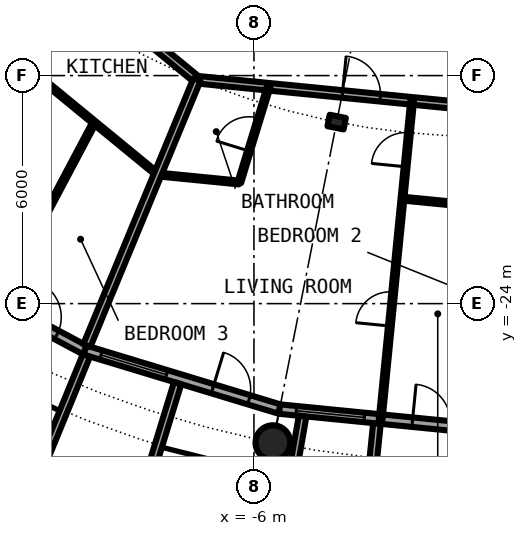
"""IFC4 building model, lengths in metres.
Left out: names, types, materials, properties, quantities, classifications, styles, units other than length and angle.
Written with IfcOpenShell. Run it as: python <this file> out.ifc"""

import sys

from ifc_helpers import new_model, si_unit, direction, frame, frame_2d, origin, origin_2d, place, context, subcontext, project, spatial, rectangle, circle, hollow_circle, i_section, extrude, element, fill, save


model = new_model("IFC4")
c1 = context("Model", 3, precision=1e-05, world=origin(), true_north=direction((0.0, 1.0)))
c2 = subcontext(c1, "Body", "Model", "MODEL_VIEW")
j1 = project(units=[si_unit("LENGTHUNIT", "METRE"), si_unit("PLANEANGLEUNIT", "RADIAN")], contexts=[c1])
p1 = place(None, origin())
s1 = spatial("IfcSite", under=j1, at=p1, CompositionType="ELEMENT")
p2 = place(p1, origin())
s2 = spatial("IfcBuilding", under=s1, at=p2, CompositionType="ELEMENT")
p3 = place(p2, frame((0.0, 0.0, 111.65)))
s3 = spatial("IfcBuildingStorey", under=s2, at=p3, CompositionType="ELEMENT", Elevation=111.65)
p4 = place(p3, frame((-5.501, -27.658, 0.0), z_axis=(0.0, 0.0, 1.0), x_axis=(1.0, 0.0, 0.0)))
e1 = element("IfcColumn", 1, at=p4, inside=s3, PredefinedType="COLUMN", context=c2, shape_type="SweptSolid", body=[
    extrude(hollow_circle(Radius=0.457, WallThickness=0.04, at=origin_2d()), origin(), (0.0, 0.0, 1.0), 3.05),
])
p5 = place(p3, frame((-3.824, -19.223, 0.0), z_axis=(0.0, 0.0, 1.0), x_axis=(-0.195090322016, -0.980785280403, 0.0)))
e2 = element("IfcColumn", 2, at=p5, inside=s3, PredefinedType="COLUMN", context=c2, shape_type="SweptSolid", body=[
    extrude(i_section(OverallWidth=0.307, OverallDepth=0.432, WebThickness=0.021, FlangeThickness=0.04, FilletRadius=0.027, at=origin_2d()), origin(), (0.0, 0.0, 1.0), 3.05),
])
p6 = place(p3, frame((-15.167, -22.699, 0.0), z_axis=(0.0, 0.0, 1.0), x_axis=(0.881915646801, -0.471407246368, 0.0)))
e3 = element("IfcWall", 3, at=p6, inside=s3, PredefinedType="SOLIDWALL", context=c2, shape_type="SweptSolid", body=[
    extrude(rectangle(XDim=5.352, YDim=0.25, at=frame_2d((2.676, 0.0))), origin(), (0.0, 0.0, 1.0), 2.7),
])
p7 = place(p6, frame((0.441, 0.0, 0.3)))
e4 = element("IfcOpeningElement", 4, at=p7, cuts=e3, PredefinedType="OPENING", context=c2, shape_type="SweptSolid", body=[
    extrude(rectangle(XDim=1.8, YDim=2.1, at=frame_2d((0.9, 1.05))), frame((0.0, 0.135, 0.0), z_axis=(0.0, -1.0, 0.0), x_axis=(1.0, 0.0, 0.0)), (0.0, 0.0, 1.0), 0.27),
])
p8 = place(p6, frame((3.51, 0.0, 0.0)))
e5 = element("IfcOpeningElement", 5, at=p8, cuts=e3, PredefinedType="OPENING", context=c2, shape_type="SweptSolid", body=[
    extrude(rectangle(XDim=1.0, YDim=2.2, at=frame_2d((0.5, 1.1))), frame((0.0, 0.135, 0.0), z_axis=(0.0, -1.0, 0.0), x_axis=(1.0, 0.0, 0.0)), (0.0, 0.0, 1.0), 0.27),
])
p9 = place(p3, frame((-10.447, -25.222, 0.0), z_axis=(0.0, 0.0, 1.0), x_axis=(0.956965678721, -0.290201119486, 0.0)))
e6 = element("IfcWall", 6, at=p9, inside=s3, PredefinedType="SOLIDWALL", context=c2, shape_type="SweptSolid", body=[
    extrude(rectangle(XDim=5.351, YDim=0.25, at=frame_2d((2.676, 0.0))), origin(), (0.0, 0.0, 1.0), 2.7),
])
p10 = place(p9, frame((0.441, 0.0, 0.3)))
e7 = element("IfcOpeningElement", 7, at=p10, cuts=e6, PredefinedType="OPENING", context=c2, shape_type="SweptSolid", body=[
    extrude(rectangle(XDim=1.8, YDim=2.1, at=frame_2d((0.9, 1.05))), frame((0.0, 0.135, 0.0), z_axis=(0.0, -1.0, 0.0), x_axis=(1.0, 0.0, 0.0)), (0.0, 0.0, 1.0), 0.27),
])
p11 = place(p9, frame((3.51, 0.0, 0.0)))
e8 = element("IfcOpeningElement", 8, at=p11, cuts=e6, PredefinedType="OPENING", context=c2, shape_type="SweptSolid", body=[
    extrude(rectangle(XDim=1.0, YDim=2.2, at=frame_2d((0.5, 1.1))), frame((0.0, 0.135, 0.0), z_axis=(0.0, -1.0, 0.0), x_axis=(1.0, 0.0, 0.0)), (0.0, 0.0, 1.0), 0.27),
])
p12 = place(p3, frame((-11.638, -28.084, -0.03), z_axis=(0.0, 0.0, 1.0), x_axis=(0.941461077774, -0.337121697664, 0.0)))
e9 = element("IfcWall", 9, at=p12, inside=s3, PredefinedType="SOLIDWALL", context=c2, shape_type="SweptSolid", body=[
    extrude(rectangle(XDim=2.993, YDim=0.2, at=frame_2d((1.497, 0.0))), origin(), (0.0, 0.0, 1.0), 2.73),
])
p13 = place(p12, frame((0.457, 0.0, 0.33)))
e10 = element("IfcOpeningElement", 10, at=p13, cuts=e9, PredefinedType="OPENING", context=c2, shape_type="SweptSolid", body=[
    extrude(circle(Radius=1.04, at=frame_2d((1.04, 1.04))), frame((0.0, 0.11, 0.0), z_axis=(0.0, -1.0, 0.0), x_axis=(1.0, 0.0, 0.0)), (0.0, 0.0, 1.0), 0.22),
])
p14 = place(p3, frame((-10.409, -25.364, -0.03), z_axis=(0.0, 0.0, 1.0), x_axis=(-0.379509886562, -0.925187681501, 0.0)))
e11 = element("IfcWall", 11, at=p14, inside=s3, PredefinedType="SOLIDWALL", context=c2, shape_type="SweptSolid", body=[
    extrude(rectangle(XDim=2.883, YDim=0.2, at=frame_2d((1.441, 0.0))), origin(), (0.0, 0.0, 1.0), 2.73),
])
p15 = place(p3, frame((-8.009, -26.092, -0.03), z_axis=(0.0, 0.0, 1.0), x_axis=(-0.293406695073, -0.955987715029, 0.0)))
e12 = element("IfcWall", 12, at=p15, inside=s3, PredefinedType="SOLIDWALL", context=c2, shape_type="SweptSolid", body=[
    extrude(rectangle(XDim=3.006, YDim=0.2, at=frame_2d((1.503, 0.0))), origin(), (0.0, 0.0, 1.0), 2.73),
])
p16 = place(p3, frame((-5.326, -26.775, 0.0), z_axis=(0.0, 0.0, 1.0), x_axis=(0.995173996315, -0.098126026407, 0.0)))
e13 = element("IfcWall", 13, at=p16, inside=s3, PredefinedType="SOLIDWALL", context=c2, shape_type="SweptSolid", body=[
    extrude(rectangle(XDim=5.352, YDim=0.25, at=frame_2d((2.676, 0.0))), origin(), (0.0, 0.0, 1.0), 2.7),
])
p17 = place(p16, frame((0.441, 0.0, 0.3)))
e14 = element("IfcOpeningElement", 14, at=p17, cuts=e13, PredefinedType="OPENING", context=c2, shape_type="SweptSolid", body=[
    extrude(rectangle(XDim=1.8, YDim=2.1, at=frame_2d((0.9, 1.05))), frame((0.0, 0.135, 0.0), z_axis=(0.0, -1.0, 0.0), x_axis=(1.0, 0.0, 0.0)), (0.0, 0.0, 1.0), 0.27),
])
p18 = place(p16, frame((3.51, 0.0, 0.0)))
e15 = element("IfcOpeningElement", 15, at=p18, cuts=e13, PredefinedType="OPENING", context=c2, shape_type="SweptSolid", body=[
    extrude(rectangle(XDim=1.0, YDim=2.2, at=frame_2d((0.5, 1.1))), frame((0.0, 0.135, 0.0), z_axis=(0.0, -1.0, 0.0), x_axis=(1.0, 0.0, 0.0)), (0.0, 0.0, 1.0), 0.27),
])
p19 = place(p3, frame((-4.72, -26.961, -0.03), z_axis=(0.0, 0.0, 1.0), x_axis=(-0.172463232037, -0.98501595601, 0.0)))
e16 = element("IfcWall", 16, at=p19, inside=s3, PredefinedType="SOLIDWALL", context=c2, shape_type="SweptSolid", body=[
    extrude(rectangle(XDim=2.929, YDim=0.2, at=frame_2d((1.464, 0.0))), origin(), (0.0, 0.0, 1.0), 2.73),
])
p20 = place(p3, frame((-2.764, -27.153, -0.03), z_axis=(0.0, 0.0, 1.0), x_axis=(-0.101505487237, -0.994834979311, 0.0)))
e17 = element("IfcWall", 17, at=p20, inside=s3, PredefinedType="SOLIDWALL", context=c2, shape_type="SweptSolid", body=[
    extrude(rectangle(XDim=3.007, YDim=0.2, at=frame_2d((1.503, 0.0))), origin(), (0.0, 0.0, 1.0), 2.73),
])
p21 = place(p3, frame((-13.538, -16.496, 0.0), z_axis=(0.0, 0.0, 1.0), x_axis=(0.773000340237, -0.634405606843, 0.0)))
e18 = element("IfcWall", 18, at=p21, inside=s3, PredefinedType="PARTITIONING", context=c2, shape_type="SweptSolid", body=[
    extrude(rectangle(XDim=6.474, YDim=0.1, at=frame_2d((3.237, 0.0))), origin(), (0.0, 0.0, 1.0), 2.7),
])
p22 = place(p3, frame((-8.541, -20.601, 0.0), z_axis=(0.0, 0.0, 1.0), x_axis=(0.995168464509, -0.098182112661, 0.0)))
e19 = element("IfcWall", 19, at=p22, inside=s3, PredefinedType="PARTITIONING", context=c2, shape_type="SweptSolid", body=[
    extrude(rectangle(XDim=2.158, YDim=0.1, at=frame_2d((1.079, 0.0))), origin(), (0.0, 0.0, 1.0), 2.7),
])
p23 = place(p3, frame((-2.092, -21.237, 0.0), z_axis=(0.0, 0.0, 1.0), x_axis=(0.995182772405, -0.098036980306, 0.0)))
e20 = element("IfcWall", 20, at=p23, inside=s3, PredefinedType="PARTITIONING", context=c2, shape_type="SweptSolid", body=[
    extrude(rectangle(XDim=6.477, YDim=0.1, at=frame_2d((3.239, 0.0))), origin(), (0.0, 0.0, 1.0), 2.7),
])
p24 = place(p3, frame((-16.173, -10.991, 0.0), z_axis=(0.0, 0.0, 1.0), x_axis=(0.773013989296, -0.634388975591, 0.0)))
e21 = element("IfcWall", 21, at=p24, inside=s3, PredefinedType="PARTITIONING", context=c2, shape_type="SweptSolid", body=[
    extrude(rectangle(XDim=11.219, YDim=0.2, at=frame_2d((5.609, 0.0))), origin(), (0.0, 0.0, 1.0), 2.39),
])
p25 = place(p24, frame((3.135, 0.0, 0.0)))
e22 = element("IfcOpeningElement", 22, at=p25, cuts=e21, PredefinedType="OPENING", context=c2, shape_type="SweptSolid", body=[
    extrude(rectangle(XDim=1.0, YDim=2.3, at=frame_2d((0.5, 1.15))), frame((0.0, 0.11, 0.0), z_axis=(0.0, -1.0, 0.0), x_axis=(1.0, 0.0, 0.0)), (0.0, 0.0, 1.0), 0.22),
])
p26 = place(p3, frame((-7.501, -18.108, 0.0), z_axis=(0.0, 0.0, 1.0), x_axis=(0.995189414306, -0.097969534313, 0.0)))
e23 = element("IfcWall", 23, at=p26, inside=s3, PredefinedType="PARTITIONING", context=c2, shape_type="SweptSolid", body=[
    extrude(rectangle(XDim=11.219, YDim=0.2, at=frame_2d((5.609, 0.0))), origin(), (0.0, 0.0, 1.0), 2.39),
])
p27 = place(p26, frame((3.847, 0.0, 0.0)))
e24 = element("IfcOpeningElement", 24, at=p27, cuts=e23, PredefinedType="OPENING", context=c2, shape_type="SweptSolid", body=[
    extrude(rectangle(XDim=1.0, YDim=2.3, at=frame_2d((0.5, 1.15))), frame((0.0, 0.11, 0.0), z_axis=(0.0, -1.0, 0.0), x_axis=(1.0, 0.0, 0.0)), (0.0, 0.0, 1.0), 0.22),
])
p28 = place(p3, frame((-2.666, -27.044, 0.0), z_axis=(0.0, 0.0, 1.0), x_axis=(0.098366640075, 0.995150241984, 0.0)))
e25 = element("IfcWall", 25, at=p28, inside=s3, PredefinedType="PARTITIONING", context=c2, shape_type="SweptSolid", body=[
    extrude(rectangle(XDim=8.419, YDim=0.1, at=frame_2d((4.209, 0.0))), origin(), (0.0, 0.0, 1.0), 2.7),
])
p29 = place(p28, frame((6.677, 0.0, 0.0)))
e26 = element("IfcOpeningElement", 26, at=p29, cuts=e25, PredefinedType="OPENING", context=c2, shape_type="SweptSolid", body=[
    extrude(rectangle(XDim=0.9, YDim=2.3, at=frame_2d((0.45, 1.15))), frame((0.0, 0.06, 0.0), z_axis=(0.0, -1.0, 0.0), x_axis=(1.0, 0.0, 0.0)), (0.0, 0.0, 1.0), 0.12),
])
p30 = place(p28, frame((2.466, 0.0, 0.0)))
e27 = element("IfcOpeningElement", 27, at=p30, cuts=e25, PredefinedType="OPENING", context=c2, shape_type="SweptSolid", body=[
    extrude(rectangle(XDim=0.9, YDim=2.3, at=frame_2d((0.45, 1.15))), frame((0.0, 0.06, 0.0), z_axis=(0.0, -1.0, 0.0), x_axis=(1.0, 0.0, 0.0)), (0.0, 0.0, 1.0), 0.12),
])
p31 = place(p3, frame((-12.734, -24.007, 0.0), z_axis=(0.0, 0.0, 1.0), x_axis=(0.468610030042, 0.883405139075, 0.0)))
e28 = element("IfcWall", 28, at=p31, inside=s3, PredefinedType="PARTITIONING", context=c2, shape_type="SweptSolid", body=[
    extrude(rectangle(XDim=5.403, YDim=0.1, at=frame_2d((2.702, 0.0))), origin(), (0.0, 0.0, 1.0), 2.7),
])
p32 = place(p31, frame((2.252, 0.0, 0.0)))
e29 = element("IfcOpeningElement", 29, at=p32, cuts=e28, PredefinedType="OPENING", context=c2, shape_type="SweptSolid", body=[
    extrude(rectangle(XDim=0.9, YDim=2.3, at=frame_2d((0.45, 1.15))), frame((0.0, 0.06, 0.0), z_axis=(0.0, -1.0, 0.0), x_axis=(1.0, 0.0, 0.0)), (0.0, 0.0, 1.0), 0.12),
])
p33 = place(p3, frame((-10.399, -25.106, 0.0), z_axis=(0.0, 0.0, 1.0), x_axis=(0.382600411313, 0.923913916587, 0.0)))
e30 = element("IfcWall", 30, at=p33, inside=s3, PredefinedType="PARTITIONING", context=c2, shape_type="SweptSolid", body=[
    extrude(rectangle(XDim=7.574, YDim=0.2, at=frame_2d((3.787, 0.0))), origin(), (0.0, 0.0, 1.0), 2.7),
])
p34 = place(p3, frame((-6.386, -20.814, 0.0), z_axis=(0.0, 0.0, 1.0), x_axis=(0.293239623814, 0.956038975683, 0.0)))
e31 = element("IfcWall", 31, at=p34, inside=s3, PredefinedType="PARTITIONING", context=c2, shape_type="SweptSolid", body=[
    extrude(rectangle(XDim=2.636, YDim=0.1, at=frame_2d((1.318, 0.0))), origin(), (0.0, 0.0, 1.0), 2.7),
])
p35 = place(p34, frame((0.868, 0.0, 0.0)))
e32 = element("IfcOpeningElement", 32, at=p35, cuts=e31, PredefinedType="OPENING", context=c2, shape_type="SweptSolid", body=[
    extrude(rectangle(XDim=0.9, YDim=2.3, at=frame_2d((0.45, 1.15))), frame((0.0, 0.06, 0.0), z_axis=(0.0, -1.0, 0.0), x_axis=(1.0, 0.0, 0.0)), (0.0, 0.0, 1.0), 0.12),
])
p36 = place(p8, origin())
e33 = element("IfcDoor", 33, at=p36, inside=s3, OperationType="SINGLE_SWING_LEFT", PredefinedType="DOOR", context=c2, shape_type="SweptSolid", body=[
    extrude(rectangle(XDim=1.0, YDim=2.2, at=frame_2d((0.5, 1.1))), frame((0.0, 0.025, 0.0), z_axis=(0.0, -1.0, 0.0), x_axis=(1.0, 0.0, 0.0)), (0.0, 0.0, 1.0), 0.05),
])
fill(e5, e33)
p37 = place(p10, origin())
e34 = element("IfcWindow", 34, at=p37, inside=s3, PartitioningType="SINGLE_PANEL", PredefinedType="WINDOW", context=c2, shape_type="SweptSolid", body=[
    extrude(rectangle(XDim=1.8, YDim=2.1, at=frame_2d((0.9, 1.05))), frame((0.0, 0.03, 0.0), z_axis=(0.0, -1.0, 0.0), x_axis=(1.0, 0.0, 0.0)), (0.0, 0.0, 1.0), 0.06),
])
fill(e7, e34)
p38 = place(p11, origin())
e35 = element("IfcDoor", 35, at=p38, inside=s3, OperationType="SINGLE_SWING_LEFT", PredefinedType="DOOR", context=c2, shape_type="SweptSolid", body=[
    extrude(rectangle(XDim=1.0, YDim=2.2, at=frame_2d((0.5, 1.1))), frame((0.0, 0.025, 0.0), z_axis=(0.0, -1.0, 0.0), x_axis=(1.0, 0.0, 0.0)), (0.0, 0.0, 1.0), 0.05),
])
fill(e8, e35)
p39 = place(p17, origin())
e36 = element("IfcWindow", 36, at=p39, inside=s3, PartitioningType="SINGLE_PANEL", PredefinedType="WINDOW", context=c2, shape_type="SweptSolid", body=[
    extrude(rectangle(XDim=1.8, YDim=2.1, at=frame_2d((0.9, 1.05))), frame((0.0, 0.03, 0.0), z_axis=(0.0, -1.0, 0.0), x_axis=(1.0, 0.0, 0.0)), (0.0, 0.0, 1.0), 0.06),
])
fill(e14, e36)
p40 = place(p18, origin())
e37 = element("IfcDoor", 37, at=p40, inside=s3, OperationType="SINGLE_SWING_LEFT", PredefinedType="DOOR", context=c2, shape_type="SweptSolid", body=[
    extrude(rectangle(XDim=1.0, YDim=2.2, at=frame_2d((0.5, 1.1))), frame((0.0, 0.025, 0.0), z_axis=(0.0, -1.0, 0.0), x_axis=(1.0, 0.0, 0.0)), (0.0, 0.0, 1.0), 0.05),
])
fill(e15, e37)
p41 = place(p32, origin())
e38 = element("IfcDoor", 38, at=p41, inside=s3, OperationType="SINGLE_SWING_LEFT", PredefinedType="DOOR", context=c2, shape_type="SweptSolid", body=[
    extrude(rectangle(XDim=0.9, YDim=2.3, at=frame_2d((0.45, 1.15))), frame((0.0, 0.025, 0.0), z_axis=(0.0, -1.0, 0.0), x_axis=(1.0, 0.0, 0.0)), (0.0, 0.0, 1.0), 0.05),
])
fill(e29, e38)
p42 = place(p27, origin())
e39 = element("IfcDoor", 39, at=p42, inside=s3, OperationType="SINGLE_SWING_LEFT", PredefinedType="DOOR", context=c2, shape_type="SweptSolid", body=[
    extrude(rectangle(XDim=1.0, YDim=2.3, at=frame_2d((0.5, 1.15))), frame((0.0, 0.025, 0.0), z_axis=(0.0, -1.0, 0.0), x_axis=(1.0, 0.0, 0.0)), (0.0, 0.0, 1.0), 0.05),
])
fill(e24, e39)
p43 = place(p35, origin())
e40 = element("IfcDoor", 40, at=p43, inside=s3, OperationType="SINGLE_SWING_LEFT", PredefinedType="DOOR", context=c2, shape_type="SweptSolid", body=[
    extrude(rectangle(XDim=0.9, YDim=2.3, at=frame_2d((0.45, 1.15))), frame((0.0, 0.025, 0.0), z_axis=(0.0, -1.0, 0.0), x_axis=(1.0, 0.0, 0.0)), (0.0, 0.0, 1.0), 0.05),
])
fill(e32, e40)
p44 = place(p29, origin())
e41 = element("IfcDoor", 41, at=p44, inside=s3, OperationType="SINGLE_SWING_RIGHT", PredefinedType="DOOR", context=c2, shape_type="SweptSolid", body=[
    extrude(rectangle(XDim=0.9, YDim=2.3, at=frame_2d((0.45, 1.15))), frame((0.0, 0.025, 0.0), z_axis=(0.0, -1.0, 0.0), x_axis=(1.0, 0.0, 0.0)), (0.0, 0.0, 1.0), 0.05),
])
fill(e26, e41)
p45 = place(p30, origin())
e42 = element("IfcDoor", 42, at=p45, inside=s3, OperationType="SINGLE_SWING_LEFT", PredefinedType="DOOR", context=c2, shape_type="SweptSolid", body=[
    extrude(rectangle(XDim=0.9, YDim=2.3, at=frame_2d((0.45, 1.15))), frame((0.0, 0.025, 0.0), z_axis=(0.0, -1.0, 0.0), x_axis=(1.0, 0.0, 0.0)), (0.0, 0.0, 1.0), 0.05),
])
fill(e27, e42)
save(model, sys.argv[1])
